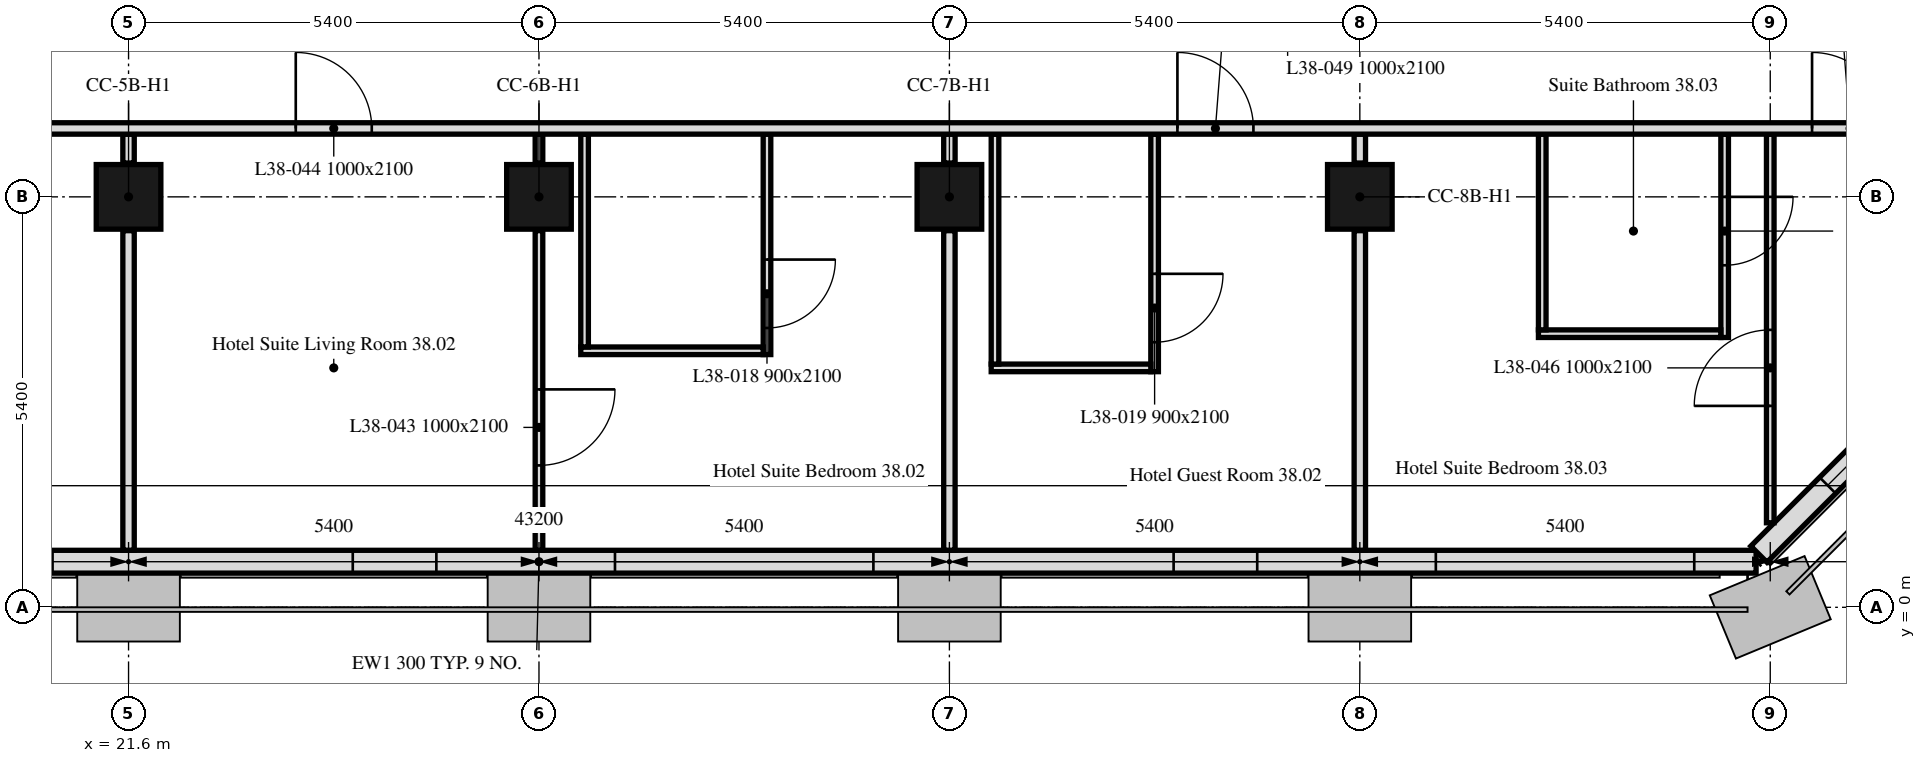
"""IFC4 building model, lengths in metres.
Left out: names, types, materials, properties, quantities, classifications, styles, units other than length and angle.
Written with IfcOpenShell. Run it as: python <this file> out.ifc"""

import sys

from ifc_helpers import new_model, si_unit, direction, frame, frame_2d, origin, origin_2d, place, context, subcontext, project, spatial, rectangle, extrude, element, fill, save


model = new_model("IFC4")
c1 = context("Model", 3, precision=1e-05, world=origin(), true_north=direction((0.0, 1.0)))
c2 = subcontext(c1, "Body", "Model", "MODEL_VIEW")
j1 = project(units=[si_unit("LENGTHUNIT", "METRE"), si_unit("PLANEANGLEUNIT", "RADIAN")], contexts=[c1])
p1 = place(None, origin())
s1 = spatial("IfcSite", under=j1, at=p1, CompositionType="ELEMENT")
p2 = place(p1, origin())
s2 = spatial("IfcBuilding", under=s1, at=p2, CompositionType="ELEMENT")
p3 = place(p2, frame((0.0, 0.0, 162.7)))
s3 = spatial("IfcBuildingStorey", under=s2, at=p3, CompositionType="ELEMENT", Elevation=162.7)
for number, where, z_axis, x_axis in (
    (1, (21.6, 5.4, 0.0), (0.0, 0.0, 1.0), (1.0, 0.0, 0.0)),
    (2, (27.0, 5.4, 0.0), (0.0, 0.0, 1.0), (1.0, 0.0, 0.0)),
    (3, (32.4, 5.4, 0.0), (0.0, 0.0, 1.0), (1.0, 0.0, 0.0)),
    (4, (37.8, 5.4, 0.0), (0.0, 0.0, 1.0), (1.0, 0.0, 0.0)),
):
    element("IfcColumn", number, at=place(p3, frame(where, z_axis=z_axis, x_axis=x_axis)), inside=s3, PredefinedType="COLUMN", context=c2, shape_type="SweptSolid", body=[
        extrude(rectangle(XDim=0.85, YDim=0.85, at=origin_2d()), origin(), (0.0, 0.0, 1.0), 3.0),
    ])
p4 = place(p3, frame((10.986, 0.6, 0.0), z_axis=(0.0, 0.0, 1.0), x_axis=(1.0, 0.0, 0.0)))
e5 = element("IfcWall", 5, at=p4, inside=s3, PredefinedType="SOLIDWALL", context=c2, shape_type="SweptSolid", body=[
    extrude(rectangle(XDim=32.027, YDim=0.3, at=frame_2d((16.014, 0.0))), origin(), (0.0, 0.0, 1.0), 3.0),
])
p5 = place(p4, frame((2.764, 0.0, 0.9)))
e6 = element("IfcOpeningElement", 6, at=p5, cuts=e5, PredefinedType="OPENING", context=c2, shape_type="SweptSolid", body=[
    extrude(rectangle(XDim=1.1, YDim=1.7, at=frame_2d((0.55, 0.85))), frame((0.0, 0.16, 0.0), z_axis=(0.0, -1.0, 0.0), x_axis=(1.0, 0.0, 0.0)), (0.0, 0.0, 1.0), 0.32),
])
p6 = place(p4, frame((6.214, 0.0, 0.9)))
e7 = element("IfcOpeningElement", 7, at=p6, cuts=e5, PredefinedType="OPENING", context=c2, shape_type="SweptSolid", body=[
    extrude(rectangle(XDim=3.4, YDim=1.7, at=frame_2d((1.7, 0.85))), frame((0.0, 0.16, 0.0), z_axis=(0.0, -1.0, 0.0), x_axis=(1.0, 0.0, 0.0)), (0.0, 0.0, 1.0), 0.32),
])
p7 = place(p4, frame((13.564, 0.0, 0.9)))
e8 = element("IfcOpeningElement", 8, at=p7, cuts=e5, PredefinedType="OPENING", context=c2, shape_type="SweptSolid", body=[
    extrude(rectangle(XDim=1.1, YDim=1.7, at=frame_2d((0.55, 0.85))), frame((0.0, 0.16, 0.0), z_axis=(0.0, -1.0, 0.0), x_axis=(1.0, 0.0, 0.0)), (0.0, 0.0, 1.0), 0.32),
])
p8 = place(p4, frame((17.014, 0.0, 0.9)))
e9 = element("IfcOpeningElement", 9, at=p8, cuts=e5, PredefinedType="OPENING", context=c2, shape_type="SweptSolid", body=[
    extrude(rectangle(XDim=3.4, YDim=1.7, at=frame_2d((1.7, 0.85))), frame((0.0, 0.16, 0.0), z_axis=(0.0, -1.0, 0.0), x_axis=(1.0, 0.0, 0.0)), (0.0, 0.0, 1.0), 0.32),
])
p9 = place(p4, frame((24.364, 0.0, 0.9)))
e10 = element("IfcOpeningElement", 10, at=p9, cuts=e5, PredefinedType="OPENING", context=c2, shape_type="SweptSolid", body=[
    extrude(rectangle(XDim=1.1, YDim=1.7, at=frame_2d((0.55, 0.85))), frame((0.0, 0.16, 0.0), z_axis=(0.0, -1.0, 0.0), x_axis=(1.0, 0.0, 0.0)), (0.0, 0.0, 1.0), 0.32),
])
p10 = place(p4, frame((27.814, 0.0, 0.9)))
e11 = element("IfcOpeningElement", 11, at=p10, cuts=e5, PredefinedType="OPENING", context=c2, shape_type="SweptSolid", body=[
    extrude(rectangle(XDim=3.4, YDim=1.7, at=frame_2d((1.7, 0.85))), frame((0.0, 0.16, 0.0), z_axis=(0.0, -1.0, 0.0), x_axis=(1.0, 0.0, 0.0)), (0.0, 0.0, 1.0), 0.32),
])
p11 = place(p3, frame((43.051, 0.699, 0.0), z_axis=(0.0, 0.0, 1.0), x_axis=(0.707106781187, 0.707106781187, 0.0)))
e12 = element("IfcWall", 12, at=p11, inside=s3, PredefinedType="SOLIDWALL", context=c2, shape_type="SweptSolid", body=[
    extrude(rectangle(XDim=6.86, YDim=0.3, at=frame_2d((3.43, 0.0))), origin(), (0.0, 0.0, 1.0), 3.0),
])
p12 = place(p11, frame((1.28, 0.0, 0.9)))
e13 = element("IfcOpeningElement", 13, at=p12, cuts=e12, PredefinedType="OPENING", context=c2, shape_type="SweptSolid", body=[
    extrude(rectangle(XDim=1.1, YDim=1.7, at=frame_2d((0.55, 0.85))), frame((0.0, 0.16, 0.0), z_axis=(0.0, -1.0, 0.0), x_axis=(1.0, 0.0, 0.0)), (0.0, 0.0, 1.0), 0.32),
])
p13 = place(p11, frame((4.48, 0.0, 0.9)))
e14 = element("IfcOpeningElement", 14, at=p13, cuts=e12, PredefinedType="OPENING", context=c2, shape_type="SweptSolid", body=[
    extrude(rectangle(XDim=1.1, YDim=1.7, at=frame_2d((0.55, 0.85))), frame((0.0, 0.16, 0.0), z_axis=(0.0, -1.0, 0.0), x_axis=(1.0, 0.0, 0.0)), (0.0, 0.0, 1.0), 0.32),
])
p14 = place(p3, frame((21.6, 0.751, 0.0), z_axis=(0.0, 0.0, 1.0), x_axis=(0.0, 1.0, 0.0)))
e15 = element("IfcWall", 15, at=p14, inside=s3, PredefinedType="PARTITIONING", context=c2, shape_type="SweptSolid", body=[
    extrude(rectangle(XDim=4.204, YDim=0.15, at=frame_2d((2.102, 0.0))), origin(), (0.0, 0.0, 1.0), 2.4),
])
p15 = place(p3, frame((21.6, 5.845, 0.0), z_axis=(0.0, 0.0, 1.0), x_axis=(0.0, 1.0, 0.0)))
e16 = element("IfcWall", 16, at=p15, inside=s3, PredefinedType="PARTITIONING", context=c2, shape_type="SweptSolid", body=[
    extrude(rectangle(XDim=0.38, YDim=0.15, at=frame_2d((0.19, 0.0))), origin(), (0.0, 0.0, 1.0), 2.4),
])
p16 = place(p3, frame((32.4, 0.751, 0.0), z_axis=(0.0, 0.0, 1.0), x_axis=(0.0, 1.0, 0.0)))
e17 = element("IfcWall", 17, at=p16, inside=s3, PredefinedType="PARTITIONING", context=c2, shape_type="SweptSolid", body=[
    extrude(rectangle(XDim=4.204, YDim=0.15, at=frame_2d((2.102, 0.0))), origin(), (0.0, 0.0, 1.0), 2.4),
])
p17 = place(p3, frame((32.4, 5.845, 0.0), z_axis=(0.0, 0.0, 1.0), x_axis=(0.0, 1.0, 0.0)))
e18 = element("IfcWall", 18, at=p17, inside=s3, PredefinedType="PARTITIONING", context=c2, shape_type="SweptSolid", body=[
    extrude(rectangle(XDim=0.38, YDim=0.15, at=frame_2d((0.19, 0.0))), origin(), (0.0, 0.0, 1.0), 2.4),
])
p18 = place(p3, frame((30.0, 6.225, 0.0), z_axis=(0.0, 0.0, 1.0), x_axis=(0.0, -1.0, 0.0)))
e19 = element("IfcWall", 19, at=p18, inside=s3, PredefinedType="PARTITIONING", context=c2, shape_type="SweptSolid", body=[
    extrude(rectangle(XDim=2.9, YDim=0.1, at=frame_2d((1.45, 0.0))), origin(), (0.0, 0.0, 1.0), 3.0),
])
p19 = place(p18, frame((1.65, 0.0, 0.0)))
e20 = element("IfcOpeningElement", 20, at=p19, cuts=e19, PredefinedType="OPENING", context=c2, shape_type="SweptSolid", body=[
    extrude(rectangle(XDim=0.9, YDim=2.1, at=frame_2d((0.45, 1.05))), frame((0.0, 0.05, 0.0), z_axis=(0.0, -1.0, 0.0), x_axis=(1.0, 0.0, 0.0)), (0.0, 0.0, 1.0), 0.1),
])
p20 = place(p3, frame((29.95, 3.375, 0.0), z_axis=(0.0, 0.0, 1.0), x_axis=(-1.0, 0.0, 0.0)))
e21 = element("IfcWall", 21, at=p20, inside=s3, PredefinedType="PARTITIONING", context=c2, shape_type="SweptSolid", body=[
    extrude(rectangle(XDim=2.4, YDim=0.1, at=frame_2d((1.2, 0.0))), origin(), (0.0, 0.0, 1.0), 3.0),
])
p21 = place(p3, frame((27.6, 3.425, 0.0), z_axis=(0.0, 0.0, 1.0), x_axis=(0.0, 1.0, 0.0)))
e22 = element("IfcWall", 22, at=p21, inside=s3, PredefinedType="PARTITIONING", context=c2, shape_type="SweptSolid", body=[
    extrude(rectangle(XDim=2.8, YDim=0.1, at=frame_2d((1.4, 0.0))), origin(), (0.0, 0.0, 1.0), 3.0),
])
p22 = place(p3, frame((27.0, 6.225, 0.0), z_axis=(0.0, 0.0, 1.0), x_axis=(0.0, -1.0, 0.0)))
e23 = element("IfcWall", 23, at=p22, inside=s3, PredefinedType="PARTITIONING", context=c2, shape_type="SweptSolid", body=[
    extrude(rectangle(XDim=0.38, YDim=0.1, at=frame_2d((0.19, 0.0))), origin(), (0.0, 0.0, 1.0), 2.4),
])
p23 = place(p3, frame((27.0, 4.955, 0.0), z_axis=(0.0, 0.0, 1.0), x_axis=(0.0, -1.0, 0.0)))
e24 = element("IfcWall", 24, at=p23, inside=s3, PredefinedType="PARTITIONING", context=c2, shape_type="SweptSolid", body=[
    extrude(rectangle(XDim=4.204, YDim=0.1, at=frame_2d((2.102, 0.0))), origin(), (0.0, 0.0, 1.0), 2.4),
])
p24 = place(p23, frame((2.088, 0.0, 0.0)))
e25 = element("IfcOpeningElement", 25, at=p24, cuts=e24, PredefinedType="OPENING", context=c2, shape_type="SweptSolid", body=[
    extrude(rectangle(XDim=1.0, YDim=2.1, at=frame_2d((0.5, 1.05))), frame((0.0, 0.05, 0.0), z_axis=(0.0, -1.0, 0.0), x_axis=(1.0, 0.0, 0.0)), (0.0, 0.0, 1.0), 0.1),
])
p25 = place(p3, frame((37.8, 0.751, 0.0), z_axis=(0.0, 0.0, 1.0), x_axis=(0.0, 1.0, 0.0)))
e26 = element("IfcWall", 26, at=p25, inside=s3, PredefinedType="PARTITIONING", context=c2, shape_type="SweptSolid", body=[
    extrude(rectangle(XDim=4.204, YDim=0.15, at=frame_2d((2.102, 0.0))), origin(), (0.0, 0.0, 1.0), 2.4),
])
p26 = place(p3, frame((37.8, 5.845, 0.0), z_axis=(0.0, 0.0, 1.0), x_axis=(0.0, 1.0, 0.0)))
e27 = element("IfcWall", 27, at=p26, inside=s3, PredefinedType="PARTITIONING", context=c2, shape_type="SweptSolid", body=[
    extrude(rectangle(XDim=0.38, YDim=0.15, at=frame_2d((0.19, 0.0))), origin(), (0.0, 0.0, 1.0), 2.4),
])
p27 = place(p3, frame((35.1, 6.225, 0.0), z_axis=(0.0, 0.0, 1.0), x_axis=(0.0, -1.0, 0.0)))
e28 = element("IfcWall", 28, at=p27, inside=s3, PredefinedType="PARTITIONING", context=c2, shape_type="SweptSolid", body=[
    extrude(rectangle(XDim=3.125, YDim=0.1, at=frame_2d((1.562, 0.0))), origin(), (0.0, 0.0, 1.0), 3.0),
])
p28 = place(p27, frame((1.837, 0.0, 0.0)))
e29 = element("IfcOpeningElement", 29, at=p28, cuts=e28, PredefinedType="OPENING", context=c2, shape_type="SweptSolid", body=[
    extrude(rectangle(XDim=0.9, YDim=2.1, at=frame_2d((0.45, 1.05))), frame((0.0, 0.05, 0.0), z_axis=(0.0, -1.0, 0.0), x_axis=(1.0, 0.0, 0.0)), (0.0, 0.0, 1.0), 0.1),
])
p29 = place(p3, frame((35.05, 3.15, 0.0), z_axis=(0.0, 0.0, 1.0), x_axis=(-1.0, 0.0, 0.0)))
e30 = element("IfcWall", 30, at=p29, inside=s3, PredefinedType="PARTITIONING", context=c2, shape_type="SweptSolid", body=[
    extrude(rectangle(XDim=2.1, YDim=0.1, at=frame_2d((1.05, 0.0))), origin(), (0.0, 0.0, 1.0), 3.0),
])
p30 = place(p3, frame((33.0, 3.2, 0.0), z_axis=(0.0, 0.0, 1.0), x_axis=(0.0, 1.0, 0.0)))
e31 = element("IfcWall", 31, at=p30, inside=s3, PredefinedType="PARTITIONING", context=c2, shape_type="SweptSolid", body=[
    extrude(rectangle(XDim=3.025, YDim=0.1, at=frame_2d((1.513, 0.0))), origin(), (0.0, 0.0, 1.0), 3.0),
])
p31 = place(p3, frame((43.2, 1.112, 0.0), z_axis=(0.0, 0.0, 1.0), x_axis=(0.0, 1.0, 0.0)))
e32 = element("IfcWall", 32, at=p31, inside=s3, PredefinedType="PARTITIONING", context=c2, shape_type="SweptSolid", body=[
    extrude(rectangle(XDim=5.113, YDim=0.1, at=frame_2d((2.557, 0.0))), origin(), (0.0, 0.0, 1.0), 3.0),
])
p32 = place(p31, frame((1.538, 0.0, 0.0)))
e33 = element("IfcOpeningElement", 33, at=p32, cuts=e32, PredefinedType="OPENING", context=c2, shape_type="SweptSolid", body=[
    extrude(rectangle(XDim=1.0, YDim=2.1, at=frame_2d((0.5, 1.05))), frame((0.0, 0.05, 0.0), z_axis=(0.0, -1.0, 0.0), x_axis=(1.0, 0.0, 0.0)), (0.0, 0.0, 1.0), 0.1),
])
p33 = place(p3, frame((42.6, 6.225, 0.0), z_axis=(0.0, 0.0, 1.0), x_axis=(0.0, -1.0, 0.0)))
e34 = element("IfcWall", 34, at=p33, inside=s3, PredefinedType="PARTITIONING", context=c2, shape_type="SweptSolid", body=[
    extrude(rectangle(XDim=2.675, YDim=0.1, at=frame_2d((1.337, 0.0))), origin(), (0.0, 0.0, 1.0), 3.0),
])
p34 = place(p33, frame((0.825, 0.0, 0.0)))
e35 = element("IfcOpeningElement", 35, at=p34, cuts=e34, PredefinedType="OPENING", context=c2, shape_type="SweptSolid", body=[
    extrude(rectangle(XDim=0.9, YDim=2.1, at=frame_2d((0.45, 1.05))), frame((0.0, 0.05, 0.0), z_axis=(0.0, -1.0, 0.0), x_axis=(1.0, 0.0, 0.0)), (0.0, 0.0, 1.0), 0.1),
])
p35 = place(p3, frame((42.55, 3.6, 0.0), z_axis=(0.0, 0.0, 1.0), x_axis=(-1.0, 0.0, 0.0)))
e36 = element("IfcWall", 36, at=p35, inside=s3, PredefinedType="PARTITIONING", context=c2, shape_type="SweptSolid", body=[
    extrude(rectangle(XDim=2.4, YDim=0.1, at=frame_2d((1.2, 0.0))), origin(), (0.0, 0.0, 1.0), 3.0),
])
p36 = place(p3, frame((40.2, 3.65, 0.0), z_axis=(0.0, 0.0, 1.0), x_axis=(0.0, 1.0, 0.0)))
e37 = element("IfcWall", 37, at=p36, inside=s3, PredefinedType="PARTITIONING", context=c2, shape_type="SweptSolid", body=[
    extrude(rectangle(XDim=2.575, YDim=0.1, at=frame_2d((1.288, 0.0))), origin(), (0.0, 0.0, 1.0), 3.0),
])
p37 = place(p3, frame((6.151, 6.3, 0.0), z_axis=(0.0, 0.0, 1.0), x_axis=(1.0, 0.0, 0.0)))
e38 = element("IfcWall", 38, at=p37, inside=s3, PredefinedType="PARTITIONING", context=c2, shape_type="SweptSolid", body=[
    extrude(rectangle(XDim=41.698, YDim=0.15, at=frame_2d((20.849, 0.0))), origin(), (0.0, 0.0, 1.0), 2.4),
])
p38 = place(p37, frame((1.132, 0.0, 0.0)))
e39 = element("IfcOpeningElement", 39, at=p38, cuts=e38, PredefinedType="OPENING", context=c2, shape_type="SweptSolid", body=[
    extrude(rectangle(XDim=1.0, YDim=2.1, at=frame_2d((0.5, 1.05))), frame((0.0, 0.075, 0.0), z_axis=(0.0, -1.0, 0.0), x_axis=(1.0, 0.0, 0.0)), (0.0, 0.0, 1.0), 0.15),
])
p39 = place(p37, frame((13.049, 0.0, 0.0)))
e40 = element("IfcOpeningElement", 40, at=p39, cuts=e38, PredefinedType="OPENING", context=c2, shape_type="SweptSolid", body=[
    extrude(rectangle(XDim=1.0, YDim=2.1, at=frame_2d((0.5, 1.05))), frame((0.0, 0.075, 0.0), z_axis=(0.0, -1.0, 0.0), x_axis=(1.0, 0.0, 0.0)), (0.0, 0.0, 1.0), 0.15),
])
p40 = place(p37, frame((17.649, 0.0, 0.0)))
e41 = element("IfcOpeningElement", 41, at=p40, cuts=e38, PredefinedType="OPENING", context=c2, shape_type="SweptSolid", body=[
    extrude(rectangle(XDim=1.0, YDim=2.1, at=frame_2d((0.5, 1.05))), frame((0.0, 0.075, 0.0), z_axis=(0.0, -1.0, 0.0), x_axis=(1.0, 0.0, 0.0)), (0.0, 0.0, 1.0), 0.15),
])
p41 = place(p37, frame((29.249, 0.0, 0.0)))
e42 = element("IfcOpeningElement", 42, at=p41, cuts=e38, PredefinedType="OPENING", context=c2, shape_type="SweptSolid", body=[
    extrude(rectangle(XDim=1.0, YDim=2.1, at=frame_2d((0.5, 1.05))), frame((0.0, 0.075, 0.0), z_axis=(0.0, -1.0, 0.0), x_axis=(1.0, 0.0, 0.0)), (0.0, 0.0, 1.0), 0.15),
])
p42 = place(p37, frame((37.599, 0.0, 0.0)))
e43 = element("IfcOpeningElement", 43, at=p42, cuts=e38, PredefinedType="OPENING", context=c2, shape_type="SweptSolid", body=[
    extrude(rectangle(XDim=1.0, YDim=2.1, at=frame_2d((0.5, 1.05))), frame((0.0, 0.075, 0.0), z_axis=(0.0, -1.0, 0.0), x_axis=(1.0, 0.0, 0.0)), (0.0, 0.0, 1.0), 0.15),
])
p43 = place(p7, origin())
e44 = element("IfcWindow", 44, at=p43, inside=s3, PartitioningType="SINGLE_PANEL", PredefinedType="WINDOW", context=c2, shape_type="SweptSolid", body=[
    extrude(rectangle(XDim=1.1, YDim=1.7, at=frame_2d((0.55, 0.85))), frame((0.0, 0.03, 0.0), z_axis=(0.0, -1.0, 0.0), x_axis=(1.0, 0.0, 0.0)), (0.0, 0.0, 1.0), 0.06),
])
fill(e8, e44)
p44 = place(p8, origin())
e45 = element("IfcWindow", 45, at=p44, inside=s3, PartitioningType="SINGLE_PANEL", PredefinedType="WINDOW", context=c2, shape_type="SweptSolid", body=[
    extrude(rectangle(XDim=3.4, YDim=1.7, at=frame_2d((1.7, 0.85))), frame((0.0, 0.03, 0.0), z_axis=(0.0, -1.0, 0.0), x_axis=(1.0, 0.0, 0.0)), (0.0, 0.0, 1.0), 0.06),
])
fill(e9, e45)
p45 = place(p9, origin())
e46 = element("IfcWindow", 46, at=p45, inside=s3, PartitioningType="SINGLE_PANEL", PredefinedType="WINDOW", context=c2, shape_type="SweptSolid", body=[
    extrude(rectangle(XDim=1.1, YDim=1.7, at=frame_2d((0.55, 0.85))), frame((0.0, 0.03, 0.0), z_axis=(0.0, -1.0, 0.0), x_axis=(1.0, 0.0, 0.0)), (0.0, 0.0, 1.0), 0.06),
])
fill(e10, e46)
p46 = place(p10, origin())
e47 = element("IfcWindow", 47, at=p46, inside=s3, PartitioningType="SINGLE_PANEL", PredefinedType="WINDOW", context=c2, shape_type="SweptSolid", body=[
    extrude(rectangle(XDim=3.4, YDim=1.7, at=frame_2d((1.7, 0.85))), frame((0.0, 0.03, 0.0), z_axis=(0.0, -1.0, 0.0), x_axis=(1.0, 0.0, 0.0)), (0.0, 0.0, 1.0), 0.06),
])
fill(e11, e47)
p47 = place(p12, origin())
e48 = element("IfcWindow", 48, at=p47, inside=s3, PartitioningType="SINGLE_PANEL", PredefinedType="WINDOW", context=c2, shape_type="SweptSolid", body=[
    extrude(rectangle(XDim=1.1, YDim=1.7, at=frame_2d((0.55, 0.85))), frame((0.0, 0.03, 0.0), z_axis=(0.0, -1.0, 0.0), x_axis=(1.0, 0.0, 0.0)), (0.0, 0.0, 1.0), 0.06),
])
fill(e13, e48)
p48 = place(p19, origin())
e49 = element("IfcDoor", 49, at=p48, inside=s3, OperationType="SINGLE_SWING_RIGHT", PredefinedType="DOOR", context=c2, shape_type="SweptSolid", body=[
    extrude(rectangle(XDim=0.9, YDim=2.1, at=frame_2d((0.45, 1.05))), frame((0.0, 0.025, 0.0), z_axis=(0.0, -1.0, 0.0), x_axis=(1.0, 0.0, 0.0)), (0.0, 0.0, 1.0), 0.05),
])
fill(e20, e49)
p49 = place(p28, origin())
e50 = element("IfcDoor", 50, at=p49, inside=s3, OperationType="SINGLE_SWING_RIGHT", PredefinedType="DOOR", context=c2, shape_type="SweptSolid", body=[
    extrude(rectangle(XDim=0.9, YDim=2.1, at=frame_2d((0.45, 1.05))), frame((0.0, 0.025, 0.0), z_axis=(0.0, -1.0, 0.0), x_axis=(1.0, 0.0, 0.0)), (0.0, 0.0, 1.0), 0.05),
])
fill(e29, e50)
p50 = place(p34, origin())
e51 = element("IfcDoor", 51, at=p50, inside=s3, OperationType="SINGLE_SWING_LEFT", PredefinedType="DOOR", context=c2, shape_type="SweptSolid", body=[
    extrude(rectangle(XDim=0.9, YDim=2.1, at=frame_2d((0.45, 1.05))), frame((0.0, 0.025, 0.0), z_axis=(0.0, -1.0, 0.0), x_axis=(1.0, 0.0, 0.0)), (0.0, 0.0, 1.0), 0.05),
])
fill(e35, e51)
p51 = place(p24, origin())
e52 = element("IfcDoor", 52, at=p51, inside=s3, OperationType="SINGLE_SWING_RIGHT", PredefinedType="DOOR", context=c2, shape_type="SweptSolid", body=[
    extrude(rectangle(XDim=1.0, YDim=2.1, at=frame_2d((0.5, 1.05))), frame((0.0, 0.025, 0.0), z_axis=(0.0, -1.0, 0.0), x_axis=(1.0, 0.0, 0.0)), (0.0, 0.0, 1.0), 0.05),
])
fill(e25, e52)
p52 = place(p40, origin())
e53 = element("IfcDoor", 53, at=p52, inside=s3, OperationType="SINGLE_SWING_LEFT", PredefinedType="DOOR", context=c2, shape_type="SweptSolid", body=[
    extrude(rectangle(XDim=1.0, YDim=2.1, at=frame_2d((0.5, 1.05))), frame((0.0, 0.025, 0.0), z_axis=(0.0, -1.0, 0.0), x_axis=(1.0, 0.0, 0.0)), (0.0, 0.0, 1.0), 0.05),
])
fill(e41, e53)
p53 = place(p41, origin())
e54 = element("IfcDoor", 54, at=p53, inside=s3, OperationType="SINGLE_SWING_LEFT", PredefinedType="DOOR", context=c2, shape_type="SweptSolid", body=[
    extrude(rectangle(XDim=1.0, YDim=2.1, at=frame_2d((0.5, 1.05))), frame((0.0, 0.025, 0.0), z_axis=(0.0, -1.0, 0.0), x_axis=(1.0, 0.0, 0.0)), (0.0, 0.0, 1.0), 0.05),
])
fill(e42, e54)
p54 = place(p32, origin())
e55 = element("IfcDoor", 55, at=p54, inside=s3, OperationType="SINGLE_SWING_LEFT", PredefinedType="DOOR", context=c2, shape_type="SweptSolid", body=[
    extrude(rectangle(XDim=1.0, YDim=2.1, at=frame_2d((0.5, 1.05))), frame((0.0, 0.025, 0.0), z_axis=(0.0, -1.0, 0.0), x_axis=(1.0, 0.0, 0.0)), (0.0, 0.0, 1.0), 0.05),
])
fill(e33, e55)
p55 = place(p42, origin())
e56 = element("IfcDoor", 56, at=p55, inside=s3, OperationType="SINGLE_SWING_RIGHT", PredefinedType="DOOR", context=c2, shape_type="SweptSolid", body=[
    extrude(rectangle(XDim=1.0, YDim=2.1, at=frame_2d((0.5, 1.05))), frame((0.0, 0.025, 0.0), z_axis=(0.0, -1.0, 0.0), x_axis=(1.0, 0.0, 0.0)), (0.0, 0.0, 1.0), 0.05),
])
fill(e43, e56)
save(model, sys.argv[1])
